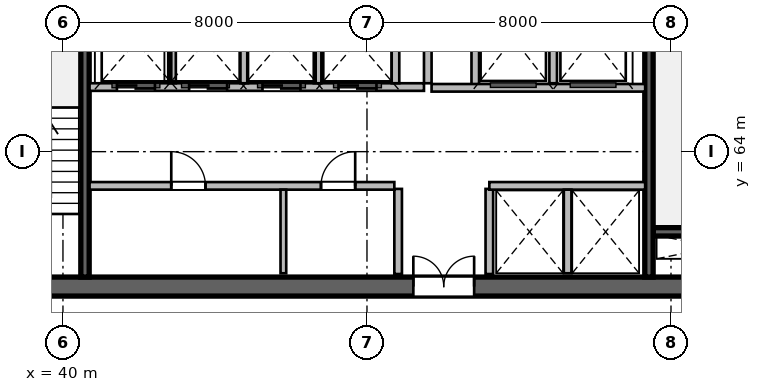
"""IFC4 building model, lengths in metres.
Left out: names, types, materials, properties, quantities, classifications, styles, units other than length and angle.
Written with IfcOpenShell. Run it as: python <this file> out.ifc"""

import sys

from ifc_helpers import new_model, si_unit, direction, frame, frame_2d, origin, place, context, subcontext, project, spatial, rectangle, extrude, source, transform, mapped, element, fill, save


model = new_model("IFC4")
c1 = context("Model", 3, precision=1e-05, world=origin(), true_north=direction((0.0, 1.0)))
c2 = subcontext(c1, "Body", "Model", "MODEL_VIEW")
j1 = project(units=[si_unit("LENGTHUNIT", "METRE"), si_unit("PLANEANGLEUNIT", "RADIAN")], contexts=[c1])
p1 = place(None, origin())
s1 = spatial("IfcSite", under=j1, at=p1, CompositionType="ELEMENT")
p2 = place(p1, origin())
s2 = spatial("IfcBuilding", under=s1, at=p2, CompositionType="ELEMENT")
p3 = place(p2, frame((0.0, 0.0, 111.6)))
s3 = spatial("IfcBuildingStorey", under=s2, at=p3, CompositionType="ELEMENT", Elevation=111.6)
m1 = source(origin(), c2, "Body", "SweptSolid", [
    extrude(rectangle(XDim=21.6, YDim=0.5, at=frame_2d((10.8, 0.0))), origin(), (0.0, 0.0, 1.0), 3.9),
])
p4 = place(p3, frame((37.2, 60.45, 0.0), z_axis=(0.0, 0.0, 1.0), x_axis=(1.0, 0.0, 0.0)))
e1 = element("IfcWall", 1, at=p4, inside=s3, PredefinedType="SHEAR", context=c2, shape_type="MappedRepresentation", body=[
    mapped(m1, transform((0.0, 0.0, 0.0), scale=1.0)),
])
p5 = place(p4, frame((1.1, 0.0, 0.0)))
e2 = element("IfcOpeningElement", 2, at=p5, cuts=e1, PredefinedType="OPENING", context=c2, shape_type="SweptSolid", body=[
    extrude(rectangle(XDim=1.15, YDim=2.15, at=frame_2d((0.575, 1.075))), frame((0.0, 0.26, 0.0), z_axis=(0.0, -1.0, 0.0), x_axis=(1.0, 0.0, 0.0)), (0.0, 0.0, 1.0), 0.52),
])
p6 = place(p4, frame((19.5, 0.0, 0.0)))
e3 = element("IfcOpeningElement", 3, at=p6, cuts=e1, PredefinedType="OPENING", context=c2, shape_type="SweptSolid", body=[
    extrude(rectangle(XDim=0.9, YDim=2.1, at=frame_2d((0.45, 1.05))), frame((0.0, 0.26, 0.0), z_axis=(0.0, -1.0, 0.0), x_axis=(1.0, 0.0, 0.0)), (0.0, 0.0, 1.0), 0.52),
])
p7 = place(p4, frame((12.02, 0.0, 0.0)))
e4 = element("IfcOpeningElement", 4, at=p7, cuts=e1, PredefinedType="OPENING", context=c2, shape_type="SweptSolid", body=[
    extrude(rectangle(XDim=1.6, YDim=2.15, at=frame_2d((0.8, 1.075))), frame((0.0, 0.26, 0.0), z_axis=(0.0, -1.0, 0.0), x_axis=(1.0, 0.0, 0.0)), (0.0, 0.0, 1.0), 0.52),
])
m2 = source(origin(), c2, "Body", "SweptSolid", [
    extrude(rectangle(XDim=3.27, YDim=0.22, at=frame_2d((1.635, 0.0))), origin(), (0.0, 0.0, 1.0), 3.9),
])
p8 = place(p3, frame((55.53, 61.89, 0.0), z_axis=(0.0, 0.0, 1.0), x_axis=(1.0, 0.0, 0.0)))
e5 = element("IfcWall", 5, at=p8, inside=s3, PredefinedType="SHEAR", context=c2, shape_type="MappedRepresentation", body=[
    mapped(m2, transform((0.0, 0.0, 0.0), scale=1.0)),
])
m3 = source(origin(), c2, "Body", "SweptSolid", [
    extrude(rectangle(XDim=11.0, YDim=0.22, at=frame_2d((5.5, 0.0))), origin(), (0.0, 0.0, 1.0), 3.9),
])
p9 = place(p3, frame((40.58, 60.7, 0.0), z_axis=(0.0, 0.0, 1.0), x_axis=(0.0, 1.0, 0.0)))
e6 = element("IfcWall", 6, at=p9, inside=s3, PredefinedType="SHEAR", context=c2, shape_type="MappedRepresentation", body=[
    mapped(m3, transform((0.0, 0.0, 0.0), scale=1.0)),
])
p10 = place(p3, frame((55.42, 60.7, 0.0), z_axis=(0.0, 0.0, 1.0), x_axis=(0.0, 1.0, 0.0)))
e7 = element("IfcWall", 7, at=p10, inside=s3, PredefinedType="SHEAR", context=c2, shape_type="MappedRepresentation", body=[
    mapped(m3, transform((0.0, 0.0, 0.0), scale=1.0)),
])
p11 = place(p10, frame((9.545, 0.0, 0.0)))
e8 = element("IfcOpeningElement", 8, at=p11, cuts=e7, PredefinedType="OPENING", context=c2, shape_type="SweptSolid", body=[
    extrude(rectangle(XDim=1.15, YDim=2.15, at=frame_2d((0.575, 1.075))), frame((0.0, 0.12, 0.0), z_axis=(0.0, -1.0, 0.0), x_axis=(1.0, 0.0, 0.0)), (0.0, 0.0, 1.0), 0.24),
])
m4 = source(origin(), c2, "Body", "SweptSolid", [
    extrude(rectangle(XDim=2.24, YDim=0.2, at=frame_2d((1.12, 0.0))), origin(), (0.0, 0.0, 1.0), 3.65),
])
for number, where, z_axis, x_axis in (
    (9, (48.82, 60.78, 0.0), (0.0, 0.0, 1.0), (0.0, 1.0, 0.0)),
    (10, (51.22, 60.78, 0.0), (0.0, 0.0, 1.0), (0.0, 1.0, 0.0)),
):
    element("IfcWall", number, at=place(p3, frame(where, z_axis=z_axis, x_axis=x_axis)), inside=s3, PredefinedType="SOLIDWALL", context=c2, shape_type="MappedRepresentation", body=[
        mapped(m4, transform((0.0, 0.0, 0.0), scale=1.0)),
    ])
m5 = source(origin(), c2, "Body", "SweptSolid", [
    extrude(rectangle(XDim=5.8, YDim=0.2, at=frame_2d((2.9, 0.0))), origin(), (0.0, 0.0, 1.0), 3.65),
])
p12 = place(p3, frame((49.6, 65.8, 0.0), z_axis=(0.0, 0.0, 1.0), x_axis=(0.0, 1.0, 0.0)))
e11 = element("IfcWall", 11, at=p12, inside=s3, PredefinedType="SOLIDWALL", context=c2, shape_type="MappedRepresentation", body=[
    mapped(m5, transform((0.0, 0.0, 0.0), scale=1.0)),
])
m6 = source(origin(), c2, "Body", "SweptSolid", [
    extrude(rectangle(XDim=2.58, YDim=0.2, at=frame_2d((1.29, 0.0))), origin(), (0.0, 0.0, 1.0), 3.65),
])
p13 = place(p3, frame((50.85, 65.68, 0.0), z_axis=(0.0, 0.0, 1.0), x_axis=(0.0, 1.0, 0.0)))
e12 = element("IfcWall", 12, at=p13, inside=s3, PredefinedType="SOLIDWALL", context=c2, shape_type="MappedRepresentation", body=[
    mapped(m6, transform((0.0, 0.0, 0.0), scale=1.0)),
])
m7 = source(origin(), c2, "Body", "SweptSolid", [
    extrude(rectangle(XDim=2.4, YDim=0.2, at=frame_2d((1.2, 0.0))), origin(), (0.0, 0.0, 1.0), 3.65),
])
p14 = place(p3, frame((52.9, 65.8, 0.0), z_axis=(0.0, 0.0, 1.0), x_axis=(0.0, 1.0, 0.0)))
e13 = element("IfcWall", 13, at=p14, inside=s3, PredefinedType="SOLIDWALL", context=c2, shape_type="MappedRepresentation", body=[
    mapped(m7, transform((0.0, 0.0, 0.0), scale=1.0)),
])
m8 = source(origin(), c2, "Body", "SweptSolid", [
    extrude(rectangle(XDim=5.62, YDim=0.2, at=frame_2d((2.81, 0.0))), origin(), (0.0, 0.0, 1.0), 3.65),
])
p15 = place(p3, frame((49.7, 65.68, 0.0), z_axis=(0.0, 0.0, 1.0), x_axis=(1.0, 0.0, 0.0)))
e14 = element("IfcWall", 14, at=p15, inside=s3, PredefinedType="SOLIDWALL", context=c2, shape_type="MappedRepresentation", body=[
    mapped(m8, transform((0.0, 0.0, 0.0), scale=1.0)),
])
m9 = source(origin(), c2, "Body", "SweptSolid", [
    extrude(rectangle(XDim=8.02, YDim=0.2, at=frame_2d((4.01, 0.0))), origin(), (0.0, 0.0, 1.0), 3.65),
])
p16 = place(p3, frame((40.7, 63.1, 0.0), z_axis=(0.0, 0.0, 1.0), x_axis=(1.0, 0.0, 0.0)))
e15 = element("IfcWall", 15, at=p16, inside=s3, PredefinedType="SOLIDWALL", context=c2, shape_type="MappedRepresentation", body=[
    mapped(m9, transform((0.0, 0.0, 0.0), scale=1.0)),
])
p17 = place(p16, frame((2.15, 0.0, 0.0)))
e16 = element("IfcOpeningElement", 16, at=p17, cuts=e15, PredefinedType="OPENING", context=c2, shape_type="SweptSolid", body=[
    extrude(rectangle(XDim=0.9, YDim=2.1, at=frame_2d((0.45, 1.05))), frame((0.0, 0.11, 0.0), z_axis=(0.0, -1.0, 0.0), x_axis=(1.0, 0.0, 0.0)), (0.0, 0.0, 1.0), 0.22),
])
p18 = place(p16, frame((6.09, 0.0, 0.0)))
e17 = element("IfcOpeningElement", 17, at=p18, cuts=e15, PredefinedType="OPENING", context=c2, shape_type="SweptSolid", body=[
    extrude(rectangle(XDim=0.9, YDim=2.1, at=frame_2d((0.45, 1.05))), frame((0.0, 0.11, 0.0), z_axis=(0.0, -1.0, 0.0), x_axis=(1.0, 0.0, 0.0)), (0.0, 0.0, 1.0), 0.22),
])
m10 = source(origin(), c2, "Body", "SweptSolid", [
    extrude(rectangle(XDim=4.1, YDim=0.2, at=frame_2d((2.05, 0.0))), origin(), (0.0, 0.0, 1.0), 3.65),
])
p19 = place(p3, frame((51.22, 63.1, 0.0), z_axis=(0.0, 0.0, 1.0), x_axis=(1.0, 0.0, 0.0)))
e18 = element("IfcWall", 18, at=p19, inside=s3, PredefinedType="SOLIDWALL", context=c2, shape_type="MappedRepresentation", body=[
    mapped(m10, transform((0.0, 0.0, 0.0), scale=1.0)),
])
m11 = source(origin(), c2, "Body", "SweptSolid", [
    extrude(rectangle(XDim=2.2, YDim=0.15, at=frame_2d((1.1, 0.0))), origin(), (0.0, 0.0, 1.0), 3.65),
])
p20 = place(p3, frame((45.8, 60.8, 0.0), z_axis=(0.0, 0.0, 1.0), x_axis=(0.0, 1.0, 0.0)))
e19 = element("IfcWall", 19, at=p20, inside=s3, PredefinedType="PARTITIONING", context=c2, shape_type="MappedRepresentation", body=[
    mapped(m11, transform((0.0, 0.0, 0.0), scale=1.0)),
])
m12 = source(origin(), c2, "Body", "SweptSolid", [
    extrude(rectangle(XDim=2.2, YDim=0.2, at=frame_2d((1.1, 0.0))), origin(), (0.0, 0.0, 1.0), 3.65),
])
p21 = place(p3, frame((53.28, 60.8, 0.0), z_axis=(0.0, 0.0, 1.0), x_axis=(0.0, 1.0, 0.0)))
e20 = element("IfcWall", 20, at=p21, inside=s3, PredefinedType="SOLIDWALL", context=c2, shape_type="MappedRepresentation", body=[
    mapped(m12, transform((0.0, 0.0, 0.0), scale=1.0)),
])
m13 = source(origin(), c2, "Body", "SweptSolid", [
    extrude(rectangle(XDim=8.8, YDim=0.2, at=frame_2d((4.4, 0.0))), origin(), (0.0, 0.0, 1.0), 3.65),
])
p22 = place(p3, frame((40.7, 65.7, 0.0), z_axis=(0.0, 0.0, 1.0), x_axis=(1.0, 0.0, 0.0)))
e21 = element("IfcWall", 21, at=p22, inside=s3, PredefinedType="SOLIDWALL", context=c2, shape_type="MappedRepresentation", body=[
    mapped(m13, transform((0.0, 0.0, 0.0), scale=1.0)),
])
p23 = place(p22, frame((0.72, 0.0, 0.0)))
e22 = element("IfcOpeningElement", 22, at=p23, cuts=e21, PredefinedType="OPENING", context=c2, shape_type="SweptSolid", body=[
    extrude(rectangle(XDim=1.0, YDim=2.15, at=frame_2d((0.5, 1.075))), frame((0.0, 0.11, 0.0), z_axis=(0.0, -1.0, 0.0), x_axis=(1.0, 0.0, 0.0)), (0.0, 0.0, 1.0), 0.22),
])
p24 = place(p22, frame((2.62, 0.0, 0.0)))
e23 = element("IfcOpeningElement", 23, at=p24, cuts=e21, PredefinedType="OPENING", context=c2, shape_type="SweptSolid", body=[
    extrude(rectangle(XDim=1.0, YDim=2.15, at=frame_2d((0.5, 1.075))), frame((0.0, 0.11, 0.0), z_axis=(0.0, -1.0, 0.0), x_axis=(1.0, 0.0, 0.0)), (0.0, 0.0, 1.0), 0.22),
])
p25 = place(p22, frame((4.55, 0.0, 0.0)))
e24 = element("IfcOpeningElement", 24, at=p25, cuts=e21, PredefinedType="OPENING", context=c2, shape_type="SweptSolid", body=[
    extrude(rectangle(XDim=1.0, YDim=2.15, at=frame_2d((0.5, 1.075))), frame((0.0, 0.11, 0.0), z_axis=(0.0, -1.0, 0.0), x_axis=(1.0, 0.0, 0.0)), (0.0, 0.0, 1.0), 0.22),
])
p26 = place(p22, frame((6.55, 0.0, 0.0)))
e25 = element("IfcOpeningElement", 25, at=p26, cuts=e21, PredefinedType="OPENING", context=c2, shape_type="SweptSolid", body=[
    extrude(rectangle(XDim=1.0, YDim=2.15, at=frame_2d((0.5, 1.075))), frame((0.0, 0.11, 0.0), z_axis=(0.0, -1.0, 0.0), x_axis=(1.0, 0.0, 0.0)), (0.0, 0.0, 1.0), 0.22),
])
for number, where, z_axis, x_axis in (
    (26, (48.75, 65.8, 0.0), (0.0, 0.0, 1.0), (0.0, 1.0, 0.0)),
    (27, (42.87, 65.8, 0.0), (0.0, 0.0, 1.0), (0.0, 1.0, 0.0)),
    (28, (44.77, 65.8, 0.0), (0.0, 0.0, 1.0), (0.0, 1.0, 0.0)),
    (29, (46.7, 65.8, 0.0), (0.0, 0.0, 1.0), (0.0, 1.0, 0.0)),
):
    element("IfcWall", number, at=place(p3, frame(where, z_axis=z_axis, x_axis=x_axis)), inside=s3, PredefinedType="SOLIDWALL", context=c2, shape_type="MappedRepresentation", body=[
        mapped(m7, transform((0.0, 0.0, 0.0), scale=1.0)),
    ])
m14 = source(origin(), c2, "Body", "SweptSolid", [
    extrude(rectangle(XDim=1.6, YDim=2.15, at=frame_2d((0.8, 1.075))), frame((0.0, 0.025, 0.0), z_axis=(0.0, -1.0, 0.0), x_axis=(1.0, 0.0, 0.0)), (0.0, 0.0, 1.0), 0.05),
])
p27 = place(p7, origin())
e30 = element("IfcDoor", 30, at=p27, inside=s3, OperationType="DOUBLE_DOOR_SINGLE_SWING", PredefinedType="DOOR", context=c2, shape_type="MappedRepresentation", body=[
    mapped(m14, transform((0.0, 0.0, 0.0), scale=1.0)),
])
fill(e4, e30)
m15 = source(origin(), c2, "Body", "SweptSolid", [
    extrude(rectangle(XDim=0.9, YDim=2.1, at=frame_2d((0.45, 1.05))), frame((0.0, 0.025, 0.0), z_axis=(0.0, -1.0, 0.0), x_axis=(1.0, 0.0, 0.0)), (0.0, 0.0, 1.0), 0.05),
])
p28 = place(p17, origin())
e31 = element("IfcDoor", 31, at=p28, inside=s3, OperationType="SINGLE_SWING_LEFT", PredefinedType="DOOR", context=c2, shape_type="MappedRepresentation", body=[
    mapped(m15, transform((0.0, 0.0, 0.0), scale=1.0)),
])
fill(e16, e31)
p29 = place(p18, origin())
e32 = element("IfcDoor", 32, at=p29, inside=s3, OperationType="SINGLE_SWING_RIGHT", PredefinedType="DOOR", context=c2, shape_type="MappedRepresentation", body=[
    mapped(m15, transform((0.0, 0.0, 0.0), scale=1.0)),
])
fill(e17, e32)
m16 = source(origin(), c2, "Body", "SweptSolid", [
    extrude(rectangle(XDim=1.0, YDim=2.15, at=frame_2d((0.5, 1.075))), frame((0.0, 0.025, 0.0), z_axis=(0.0, -1.0, 0.0), x_axis=(1.0, 0.0, 0.0)), (0.0, 0.0, 1.0), 0.05),
])
p30 = place(p23, origin())
e33 = element("IfcDoor", 33, at=p30, inside=s3, OperationType="DOUBLE_DOOR_SLIDING", PredefinedType="DOOR", context=c2, shape_type="MappedRepresentation", body=[
    mapped(m16, transform((0.0, 0.0, 0.0), scale=1.0)),
])
fill(e22, e33)
p31 = place(p24, origin())
e34 = element("IfcDoor", 34, at=p31, inside=s3, OperationType="DOUBLE_DOOR_SLIDING", PredefinedType="DOOR", context=c2, shape_type="MappedRepresentation", body=[
    mapped(m16, transform((0.0, 0.0, 0.0), scale=1.0)),
])
fill(e23, e34)
p32 = place(p25, origin())
e35 = element("IfcDoor", 35, at=p32, inside=s3, OperationType="DOUBLE_DOOR_SLIDING", PredefinedType="DOOR", context=c2, shape_type="MappedRepresentation", body=[
    mapped(m16, transform((0.0, 0.0, 0.0), scale=1.0)),
])
fill(e24, e35)
p33 = place(p26, origin())
e36 = element("IfcDoor", 36, at=p33, inside=s3, OperationType="DOUBLE_DOOR_SLIDING", PredefinedType="DOOR", context=c2, shape_type="MappedRepresentation", body=[
    mapped(m16, transform((0.0, 0.0, 0.0), scale=1.0)),
])
fill(e25, e36)
save(model, sys.argv[1])
